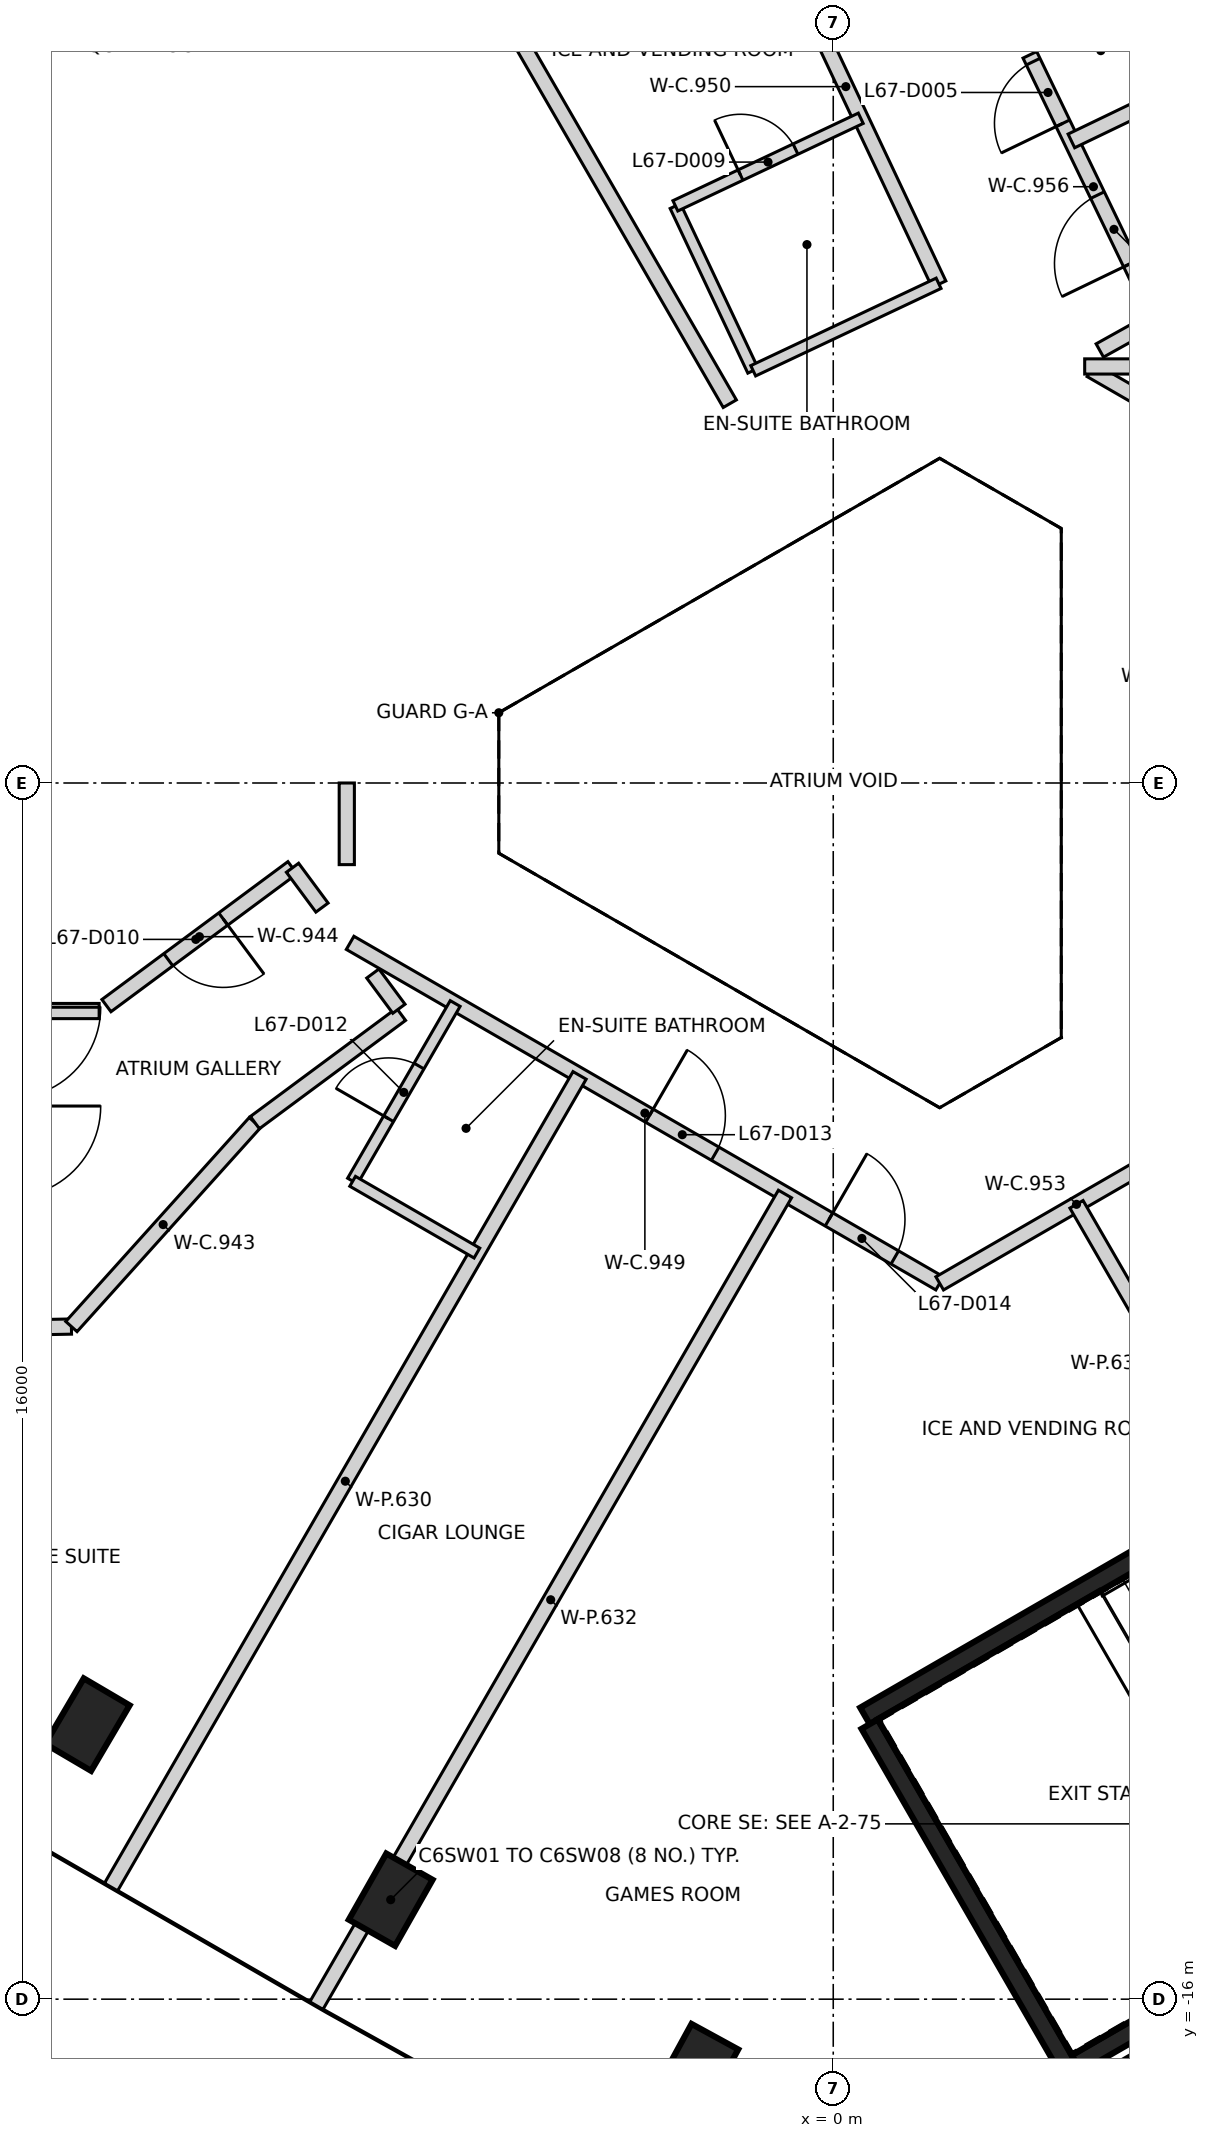
"""IFC4 building model, lengths in metres.
Left out: names, types, materials, properties, quantities, classifications, styles, units other than length and angle.
Written with IfcOpenShell. Run it as: python <this file> out.ifc"""

import sys

from ifc_helpers import new_model, si_unit, direction, frame, frame_2d, origin, origin_2d, place, context, subcontext, project, spatial, rectangle, extrude, element, fill, save


model = new_model("IFC4")
c1 = context("Model", 3, precision=1e-05, world=origin(), true_north=direction((0.0, 1.0)))
c2 = subcontext(c1, "Body", "Model", "MODEL_VIEW")
j1 = project(units=[si_unit("LENGTHUNIT", "METRE"), si_unit("PLANEANGLEUNIT", "RADIAN")], contexts=[c1])
p1 = place(None, origin())
s1 = spatial("IfcSite", under=j1, at=p1, CompositionType="ELEMENT")
p2 = place(p1, origin())
s2 = spatial("IfcBuilding", under=s1, at=p2, CompositionType="ELEMENT")
p3 = place(p2, frame((0.0, 0.0, 265.8)))
s3 = spatial("IfcBuildingStorey", under=s2, at=p3, CompositionType="ELEMENT", Elevation=265.8)
for number, where, z_axis, x_axis in (
    (1, (-9.812, -12.388, -0.35), (0.0, 0.0, 1.0), (0.507, 0.862, 0.0)),
    (2, (-5.822, -14.691, -0.35), (0.0, 0.0, 1.0), (0.493, 0.87, 0.0)),
    (3, (-1.797, -16.932, -0.35), (0.0, 0.0, 1.0), (0.479, 0.878, 0.0)),
):
    element("IfcColumn", number, at=place(p3, frame(where, z_axis=z_axis, x_axis=x_axis)), inside=s3, PredefinedType="COLUMN", context=c2, shape_type="SweptSolid", body=[
        extrude(rectangle(XDim=1.0, YDim=0.7, at=origin_2d()), origin(), (0.0, 0.0, 1.0), 3.6),
    ])
p4 = place(p3, frame((10.42, 6.498, 0.0), z_axis=(0.0, 0.0, 1.0), x_axis=(-0.866021906294, 0.500006057782, 0.0)))
e4 = element("IfcWall", 4, at=p4, inside=s3, PredefinedType="SHEAR", context=c2, shape_type="SweptSolid", body=[
    extrude(rectangle(XDim=11.55, YDim=0.25, at=frame_2d((5.775, 0.0))), origin(), (0.0, 0.0, 1.0), 3.25),
])
p5 = place(p4, frame((10.025, 0.0, 0.0)))
e5 = element("IfcOpeningElement", 5, at=p5, cuts=e4, PredefinedType="OPENING", context=c2, shape_type="SweptSolid", body=[
    extrude(rectangle(XDim=1.2, YDim=2.1, at=frame_2d((0.6, 1.05))), frame((0.0, 0.135, 0.0), z_axis=(0.0, -1.0, 0.0), x_axis=(1.0, 0.0, 0.0)), (0.0, 0.0, 1.0), 0.27),
])
p6 = place(p4, frame((8.725, 0.0, 0.0)))
e6 = element("IfcOpeningElement", 6, at=p6, cuts=e4, PredefinedType="OPENING", context=c2, shape_type="SweptSolid", body=[
    extrude(rectangle(XDim=1.2, YDim=2.1, at=frame_2d((0.6, 1.05))), frame((0.0, 0.135, 0.0), z_axis=(0.0, -1.0, 0.0), x_axis=(1.0, 0.0, 0.0)), (0.0, 0.0, 1.0), 0.27),
])
p7 = place(p3, frame((0.417, -12.273, 0.0), z_axis=(0.0, 0.0, 1.0), x_axis=(0.866021906294, 0.500006057782, 0.0)))
e7 = element("IfcWall", 7, at=p7, inside=s3, PredefinedType="SHEAR", context=c2, shape_type="SweptSolid", body=[
    extrude(rectangle(XDim=11.55, YDim=0.25, at=frame_2d((5.775, 0.0))), origin(), (0.0, 0.0, 1.0), 3.25),
])
p8 = place(p7, frame((10.025, 0.0, 0.0)))
e8 = element("IfcOpeningElement", 8, at=p8, cuts=e7, PredefinedType="OPENING", context=c2, shape_type="SweptSolid", body=[
    extrude(rectangle(XDim=1.2, YDim=2.1, at=frame_2d((0.6, 1.05))), frame((0.0, 0.135, 0.0), z_axis=(0.0, -1.0, 0.0), x_axis=(1.0, 0.0, 0.0)), (0.0, 0.0, 1.0), 0.27),
])
p9 = place(p7, frame((8.725, 0.0, 0.0)))
e9 = element("IfcOpeningElement", 9, at=p9, cuts=e7, PredefinedType="OPENING", context=c2, shape_type="SweptSolid", body=[
    extrude(rectangle(XDim=1.2, YDim=2.1, at=frame_2d((0.6, 1.05))), frame((0.0, 0.135, 0.0), z_axis=(0.0, -1.0, 0.0), x_axis=(1.0, 0.0, 0.0)), (0.0, 0.0, 1.0), 0.27),
])
p10 = place(p3, frame((3.235, -17.153, 0.0), z_axis=(0.0, 0.0, 1.0), x_axis=(-0.500008851346, 0.866020293397, 0.0)))
e10 = element("IfcWall", 10, at=p10, inside=s3, PredefinedType="SHEAR", context=c2, shape_type="SweptSolid", body=[
    extrude(rectangle(XDim=5.51, YDim=0.25, at=frame_2d((2.755, 0.0))), origin(), (0.0, 0.0, 1.0), 3.25),
])
p11 = place(p3, frame((1.669, -18.19, 0.0), z_axis=(0.0, 0.0, 1.0), x_axis=(0.866042235819, 0.499970844928, 0.0)))
e11 = element("IfcWall", 11, at=p11, inside=s3, PredefinedType="SHEAR", context=c2, shape_type="SweptSolid", body=[
    extrude(rectangle(XDim=2.865, YDim=0.25, at=frame_2d((1.432, 0.0))), origin(), (0.0, 0.0, 1.0), 3.25),
])
p12 = place(p3, frame((5.431, -15.556, 0.0), z_axis=(0.0, 0.0, 1.0), x_axis=(-0.866022940537, -0.500004266446, 0.0)))
e12 = element("IfcWall", 12, at=p12, inside=s3, PredefinedType="SHEAR", context=c2, shape_type="SweptSolid", body=[
    extrude(rectangle(XDim=2.575, YDim=0.25, at=frame_2d((1.287, 0.0))), origin(), (0.0, 0.0, 1.0), 3.25),
])
p13 = place(p3, frame((-16.732, -7.282, 0.0), z_axis=(0.0, 0.0, 1.0), x_axis=(0.999809119854, 0.019537754635, 0.0)))
e13 = element("IfcWall", 13, at=p13, inside=s3, PredefinedType="PARTITIONING", context=c2, shape_type="SweptSolid", body=[
    extrude(rectangle(XDim=6.71, YDim=0.2, at=frame_2d((3.355, 0.0))), origin(), (0.0, 0.0, 1.0), 3.25),
])
p14 = place(p13, frame((3.619, 0.0, 0.0)))
e14 = element("IfcOpeningElement", 14, at=p14, cuts=e13, PredefinedType="OPENING", context=c2, shape_type="SweptSolid", body=[
    extrude(rectangle(XDim=0.95, YDim=2.1, at=frame_2d((0.475, 1.05))), frame((0.0, 0.11, 0.0), z_axis=(0.0, -1.0, 0.0), x_axis=(1.0, 0.0, 0.0)), (0.0, 0.0, 1.0), 0.22),
])
p15 = place(p3, frame((-10.652, -3.0, 0.0), z_axis=(0.0, 0.0, 1.0), x_axis=(1.0, 0.0, 0.0)))
e15 = element("IfcWall", 15, at=p15, inside=s3, PredefinedType="PARTITIONING", context=c2, shape_type="SweptSolid", body=[
    extrude(rectangle(XDim=0.994, YDim=0.2, at=frame_2d((0.497, 0.0))), origin(), (0.0, 0.0, 1.0), 3.25),
])
p16 = place(p3, frame((-10.023, -7.151, 0.0), z_axis=(0.0, 0.0, 1.0), x_axis=(0.668886243279, 0.743364778256, 0.0)))
e16 = element("IfcWall", 16, at=p16, inside=s3, PredefinedType="PARTITIONING", context=c2, shape_type="SweptSolid", body=[
    extrude(rectangle(XDim=3.609, YDim=0.2, at=frame_2d((1.805, 0.0))), origin(), (0.0, 0.0, 1.0), 3.25),
])
p17 = place(p3, frame((-7.115, -1.115, 0.0), z_axis=(0.0, 0.0, 1.0), x_axis=(-0.803344165632, -0.595515030495, 0.0)))
e17 = element("IfcWall", 17, at=p17, inside=s3, PredefinedType="PARTITIONING", context=c2, shape_type="SweptSolid", body=[
    extrude(rectangle(XDim=3.046, YDim=0.2, at=frame_2d((1.523, 0.0))), origin(), (0.0, 0.0, 1.0), 3.25),
])
p18 = place(p17, frame((1.133, 0.0, 0.0)))
e18 = element("IfcOpeningElement", 18, at=p18, cuts=e17, PredefinedType="OPENING", context=c2, shape_type="SweptSolid", body=[
    extrude(rectangle(XDim=0.9, YDim=2.1, at=frame_2d((0.45, 1.05))), frame((0.0, 0.11, 0.0), z_axis=(0.0, -1.0, 0.0), x_axis=(1.0, 0.0, 0.0)), (0.0, 0.0, 1.0), 0.22),
])
p19 = place(p3, frame((-7.609, -4.468, 0.0), z_axis=(0.0, 0.0, 1.0), x_axis=(0.803414413351, 0.595420255298, 0.0)))
e19 = element("IfcWall", 19, at=p19, inside=s3, PredefinedType="PARTITIONING", context=c2, shape_type="SweptSolid", body=[
    extrude(rectangle(XDim=2.393, YDim=0.2, at=frame_2d((1.197, 0.0))), origin(), (0.0, 0.0, 1.0), 3.25),
])
p20 = place(p3, frame((-7.114, -1.115, 0.0), z_axis=(0.0, 0.0, 1.0), x_axis=(0.595075286625, -0.803669959155, 0.0)))
e20 = element("IfcWall", 20, at=p20, inside=s3, PredefinedType="PARTITIONING", context=c2, shape_type="SweptSolid", body=[
    extrude(rectangle(XDim=0.652, YDim=0.2, at=frame_2d((0.326, 0.0))), origin(), (0.0, 0.0, 1.0), 3.25),
])
p21 = place(p3, frame((-6.4, -1.074, 0.0), z_axis=(0.0, 0.0, 1.0), x_axis=(0.0, 1.0, 0.0)))
e21 = element("IfcWall", 21, at=p21, inside=s3, PredefinedType="PARTITIONING", context=c2, shape_type="SweptSolid", body=[
    extrude(rectangle(XDim=1.074, YDim=0.2, at=frame_2d((0.537, 0.0))), origin(), (0.0, 0.0, 1.0), 3.25),
])
p22 = place(p3, frame((-6.057, -2.507, 0.0), z_axis=(0.0, 0.0, 1.0), x_axis=(0.594974339713, -0.803744695213, 0.0)))
e22 = element("IfcWall", 22, at=p22, inside=s3, PredefinedType="PARTITIONING", context=c2, shape_type="SweptSolid", body=[
    extrude(rectangle(XDim=0.576, YDim=0.2, at=frame_2d((0.288, 0.0))), origin(), (0.0, 0.0, 1.0), 3.25),
])
p23 = place(p3, frame((-6.356, -2.103, 0.0), z_axis=(0.0, 0.0, 1.0), x_axis=(0.865939059902, -0.50014952218, 0.0)))
e23 = element("IfcWall", 23, at=p23, inside=s3, PredefinedType="PARTITIONING", context=c2, shape_type="SweptSolid", body=[
    extrude(rectangle(XDim=8.956, YDim=0.2, at=frame_2d((4.478, 0.0))), origin(), (0.0, 0.0, 1.0), 3.25),
])
p24 = place(p23, frame((4.546, 0.0, 0.0)))
e24 = element("IfcOpeningElement", 24, at=p24, cuts=e23, PredefinedType="OPENING", context=c2, shape_type="SweptSolid", body=[
    extrude(rectangle(XDim=1.0, YDim=2.1, at=frame_2d((0.5, 1.05))), frame((0.0, 0.11, 0.0), z_axis=(0.0, -1.0, 0.0), x_axis=(1.0, 0.0, 0.0)), (0.0, 0.0, 1.0), 0.22),
])
p25 = place(p23, frame((7.275, 0.0, 0.0)))
e25 = element("IfcOpeningElement", 25, at=p25, cuts=e23, PredefinedType="OPENING", context=c2, shape_type="SweptSolid", body=[
    extrude(rectangle(XDim=1.0, YDim=2.1, at=frame_2d((0.5, 1.05))), frame((0.0, 0.11, 0.0), z_axis=(0.0, -1.0, 0.0), x_axis=(1.0, 0.0, 0.0)), (0.0, 0.0, 1.0), 0.22),
])
p26 = place(p3, frame((-1.06, 11.76, 0.0), z_axis=(0.0, 0.0, 1.0), x_axis=(0.426549824954, -0.904464066081, 0.0)))
e26 = element("IfcWall", 26, at=p26, inside=s3, PredefinedType="PARTITIONING", context=c2, shape_type="SweptSolid", body=[
    extrude(rectangle(XDim=5.747, YDim=0.2, at=frame_2d((2.873, 0.0))), origin(), (0.0, 0.0, 1.0), 3.25),
])
p27 = place(p3, frame((1.401, -6.583, 0.0), z_axis=(0.0, 0.0, 1.0), x_axis=(0.865818713766, 0.500357826853, 0.0)))
e27 = element("IfcWall", 27, at=p27, inside=s3, PredefinedType="PARTITIONING", context=c2, shape_type="SweptSolid", body=[
    extrude(rectangle(XDim=4.157, YDim=0.2, at=frame_2d((2.079, 0.0))), origin(), (0.0, 0.0, 1.0), 3.25),
])
p28 = place(p3, frame((4.26, 6.109, 0.0), z_axis=(0.0, 0.0, 1.0), x_axis=(-0.434189007872, 0.900821794498, 0.0)))
e28 = element("IfcWall", 28, at=p28, inside=s3, PredefinedType="PARTITIONING", context=c2, shape_type="SweptSolid", body=[
    extrude(rectangle(XDim=3.853, YDim=0.2, at=frame_2d((1.926, 0.0))), origin(), (0.0, 0.0, 1.0), 3.25),
])
p29 = place(p28, frame((2.853, 0.0, 0.0)))
e29 = element("IfcOpeningElement", 29, at=p29, cuts=e28, PredefinedType="OPENING", context=c2, shape_type="SweptSolid", body=[
    extrude(rectangle(XDim=0.9, YDim=2.1, at=frame_2d((0.45, 1.05))), frame((0.0, 0.11, 0.0), z_axis=(0.0, -1.0, 0.0), x_axis=(1.0, 0.0, 0.0)), (0.0, 0.0, 1.0), 0.22),
])
p30 = place(p28, frame((0.804, 0.0, 0.0)))
e30 = element("IfcOpeningElement", 30, at=p30, cuts=e28, PredefinedType="OPENING", context=c2, shape_type="SweptSolid", body=[
    extrude(rectangle(XDim=1.0, YDim=2.1, at=frame_2d((0.5, 1.05))), frame((0.0, 0.11, 0.0), z_axis=(0.0, -1.0, 0.0), x_axis=(1.0, 0.0, 0.0)), (0.0, 0.0, 1.0), 0.22),
])
p31 = place(p3, frame((3.39, 5.433, 0.0), z_axis=(0.0, 0.0, 1.0), x_axis=(0.866117799835, -0.499839931186, 0.0)))
e31 = element("IfcWall", 31, at=p31, inside=s3, PredefinedType="PARTITIONING", context=c2, shape_type="SweptSolid", body=[
    extrude(rectangle(XDim=1.859, YDim=0.2, at=frame_2d((0.929, 0.0))), origin(), (0.0, 0.0, 1.0), 3.25),
])
p32 = place(p3, frame((3.507, 5.69, 0.0), z_axis=(0.0, 0.0, 1.0), x_axis=(0.873567976284, 0.486702158215, 0.0)))
e32 = element("IfcWall", 32, at=p32, inside=s3, PredefinedType="PARTITIONING", context=c2, shape_type="SweptSolid", body=[
    extrude(rectangle(XDim=0.861, YDim=0.2, at=frame_2d((0.43, 0.0))), origin(), (0.0, 0.0, 1.0), 3.25),
])
p33 = place(p3, frame((-9.501, -14.524, 0.0), z_axis=(0.0, 0.0, 1.0), x_axis=(0.499964147476, 0.86604610226, 0.0)))
e33 = element("IfcWall", 33, at=p33, inside=s3, PredefinedType="PARTITIONING", context=c2, shape_type="SweptSolid", body=[
    extrude(rectangle(XDim=12.329, YDim=0.2, at=frame_2d((6.165, 0.0))), origin(), (0.0, 0.0, 1.0), 2.35),
])
p34 = place(p3, frame((-7.524, 15.666, 0.0), z_axis=(0.0, 0.0, 1.0), x_axis=(0.499979611936, -0.866037174519, 0.0)))
e34 = element("IfcWall", 34, at=p34, inside=s3, PredefinedType="PARTITIONING", context=c2, shape_type="SweptSolid", body=[
    extrude(rectangle(XDim=12.327, YDim=0.2, at=frame_2d((6.164, 0.0))), origin(), (0.0, 0.0, 1.0), 2.35),
])
p35 = place(p3, frame((-6.8, -16.084, 0.0), z_axis=(0.0, 0.0, 1.0), x_axis=(0.500002425662, 0.866024003323, 0.0)))
e35 = element("IfcWall", 35, at=p35, inside=s3, PredefinedType="PARTITIONING", context=c2, shape_type="SweptSolid", body=[
    extrude(rectangle(XDim=12.329, YDim=0.2, at=frame_2d((6.165, 0.0))), origin(), (0.0, 0.0, 1.0), 3.25),
])
p36 = place(p3, frame((3.133, 8.447, 0.0), z_axis=(0.0, 0.0, 1.0), x_axis=(0.900981876458, 0.433856725538, 0.0)))
e36 = element("IfcWall", 36, at=p36, inside=s3, PredefinedType="PARTITIONING", context=c2, shape_type="SweptSolid", body=[
    extrude(rectangle(XDim=2.143, YDim=0.2, at=frame_2d((1.071, 0.0))), origin(), (0.0, 0.0, 1.0), 3.25),
])
p37 = place(p3, frame((3.2, -5.543, 0.0), z_axis=(0.0, 0.0, 1.0), x_axis=(0.500060428066, -0.865990512813, 0.0)))
e37 = element("IfcWall", 37, at=p37, inside=s3, PredefinedType="PARTITIONING", context=c2, shape_type="SweptSolid", body=[
    extrude(rectangle(XDim=4.252, YDim=0.2, at=frame_2d((2.126, 0.0))), origin(), (0.0, 0.0, 1.0), 3.25),
])
p38 = place(p3, frame((3.308, 5.48, 0.0), z_axis=(0.0, 0.0, 1.0), x_axis=(1.0, 0.0, 0.0)))
e38 = element("IfcWall", 38, at=p38, inside=s3, PredefinedType="PARTITIONING", context=c2, shape_type="SweptSolid", body=[
    extrude(rectangle(XDim=13.971, YDim=0.2, at=frame_2d((6.986, 0.0))), origin(), (0.0, 0.0, 1.0), 2.35),
])
p39 = place(p3, frame((-6.324, -5.237, 0.0), z_axis=(0.0, 0.0, 1.0), x_axis=(0.500294180644, 0.865855491877, 0.0)))
e39 = element("IfcWall", 39, at=p39, inside=s3, PredefinedType="PARTITIONING", context=c2, shape_type="SweptSolid", body=[
    extrude(rectangle(XDim=2.698, YDim=0.15, at=frame_2d((1.349, 0.0))), origin(), (0.0, 0.0, 1.0), 3.25),
])
p40 = place(p39, frame((0.948, 0.0, 0.0)))
e40 = element("IfcOpeningElement", 40, at=p40, cuts=e39, PredefinedType="OPENING", context=c2, shape_type="SweptSolid", body=[
    extrude(rectangle(XDim=0.8, YDim=2.1, at=frame_2d((0.4, 1.05))), frame((0.0, 0.085, 0.0), z_axis=(0.0, -1.0, 0.0), x_axis=(1.0, 0.0, 0.0)), (0.0, 0.0, 1.0), 0.17),
])
p41 = place(p3, frame((-6.323, -5.24, 0.0), z_axis=(0.0, 0.0, 1.0), x_axis=(0.865998231832, -0.50004706025, 0.0)))
e41 = element("IfcWall", 41, at=p41, inside=s3, PredefinedType="PARTITIONING", context=c2, shape_type="SweptSolid", body=[
    extrude(rectangle(XDim=1.888, YDim=0.15, at=frame_2d((0.944, 0.0))), origin(), (0.0, 0.0, 1.0), 3.25),
])
p42 = place(p3, frame((-2.078, 7.59, 0.0), z_axis=(0.0, 0.0, 1.0), x_axis=(0.426709924428, -0.904388545037, 0.0)))
e42 = element("IfcWall", 42, at=p42, inside=s3, PredefinedType="PARTITIONING", context=c2, shape_type="SweptSolid", body=[
    extrude(rectangle(XDim=2.395, YDim=0.15, at=frame_2d((1.198, 0.0))), origin(), (0.0, 0.0, 1.0), 3.25),
])
p43 = place(p3, frame((-2.077, 7.593, 0.0), z_axis=(0.0, 0.0, 1.0), x_axis=(0.904196218291, 0.427117312724, 0.0)))
e43 = element("IfcWall", 43, at=p43, inside=s3, PredefinedType="PARTITIONING", context=c2, shape_type="SweptSolid", body=[
    extrude(rectangle(XDim=2.697, YDim=0.15, at=frame_2d((1.349, 0.0))), origin(), (0.0, 0.0, 1.0), 3.25),
])
p44 = place(p43, frame((0.948, 0.0, 0.0)))
e44 = element("IfcOpeningElement", 44, at=p44, cuts=e43, PredefinedType="OPENING", context=c2, shape_type="SweptSolid", body=[
    extrude(rectangle(XDim=0.8, YDim=2.1, at=frame_2d((0.4, 1.05))), frame((0.0, 0.085, 0.0), z_axis=(0.0, -1.0, 0.0), x_axis=(1.0, 0.0, 0.0)), (0.0, 0.0, 1.0), 0.17),
])
p45 = place(p3, frame((-1.053, 5.423, 0.0), z_axis=(0.0, 0.0, 1.0), x_axis=(0.904370950432, 0.426747213247, 0.0)))
e45 = element("IfcWall", 45, at=p45, inside=s3, PredefinedType="PARTITIONING", context=c2, shape_type="SweptSolid", body=[
    extrude(rectangle(XDim=2.697, YDim=0.15, at=frame_2d((1.348, 0.0))), origin(), (0.0, 0.0, 1.0), 3.25),
])
p46 = place(p29, origin())
e46 = element("IfcDoor", 46, at=p46, inside=s3, OperationType="SINGLE_SWING_LEFT", PredefinedType="DOOR", context=c2, shape_type="SweptSolid", body=[
    extrude(rectangle(XDim=0.9, YDim=2.1, at=frame_2d((0.45, 1.05))), frame((0.0, 0.025, 0.0), z_axis=(0.0, -1.0, 0.0), x_axis=(1.0, 0.0, 0.0)), (0.0, 0.0, 1.0), 0.05),
])
fill(e29, e46)
p47 = place(p30, origin())
e47 = element("IfcDoor", 47, at=p47, inside=s3, OperationType="SINGLE_SWING_LEFT", PredefinedType="DOOR", context=c2, shape_type="SweptSolid", body=[
    extrude(rectangle(XDim=1.0, YDim=2.1, at=frame_2d((0.5, 1.05))), frame((0.0, 0.025, 0.0), z_axis=(0.0, -1.0, 0.0), x_axis=(1.0, 0.0, 0.0)), (0.0, 0.0, 1.0), 0.05),
])
fill(e30, e47)
p48 = place(p44, origin())
e48 = element("IfcDoor", 48, at=p48, inside=s3, OperationType="SINGLE_SWING_LEFT", PredefinedType="DOOR", context=c2, shape_type="SweptSolid", body=[
    extrude(rectangle(XDim=0.8, YDim=2.1, at=frame_2d((0.4, 1.05))), frame((0.0, 0.025, 0.0), z_axis=(0.0, -1.0, 0.0), x_axis=(1.0, 0.0, 0.0)), (0.0, 0.0, 1.0), 0.05),
])
fill(e44, e48)
p49 = place(p18, origin())
e49 = element("IfcDoor", 49, at=p49, inside=s3, OperationType="SINGLE_SWING_LEFT", PredefinedType="DOOR", context=c2, shape_type="SweptSolid", body=[
    extrude(rectangle(XDim=0.9, YDim=2.1, at=frame_2d((0.45, 1.05))), frame((0.0, 0.025, 0.0), z_axis=(0.0, -1.0, 0.0), x_axis=(1.0, 0.0, 0.0)), (0.0, 0.0, 1.0), 0.05),
])
fill(e18, e49)
p50 = place(p40, origin())
e50 = element("IfcDoor", 50, at=p50, inside=s3, OperationType="SINGLE_SWING_LEFT", PredefinedType="DOOR", context=c2, shape_type="SweptSolid", body=[
    extrude(rectangle(XDim=0.8, YDim=2.1, at=frame_2d((0.4, 1.05))), frame((0.0, 0.025, 0.0), z_axis=(0.0, -1.0, 0.0), x_axis=(1.0, 0.0, 0.0)), (0.0, 0.0, 1.0), 0.05),
])
fill(e40, e50)
p51 = place(p24, frame((1.0, 0.0, 0.0), z_axis=(0.0, 0.0, 1.0), x_axis=(-1.0, 0.0, 0.0)))
e51 = element("IfcDoor", 51, at=p51, inside=s3, OperationType="SINGLE_SWING_LEFT", PredefinedType="DOOR", context=c2, shape_type="SweptSolid", body=[
    extrude(rectangle(XDim=1.0, YDim=2.1, at=frame_2d((0.5, 1.05))), frame((0.0, 0.025, 0.0), z_axis=(0.0, -1.0, 0.0), x_axis=(1.0, 0.0, 0.0)), (0.0, 0.0, 1.0), 0.05),
])
fill(e24, e51)
p52 = place(p25, frame((1.0, 0.0, 0.0), z_axis=(0.0, 0.0, 1.0), x_axis=(-1.0, 0.0, 0.0)))
e52 = element("IfcDoor", 52, at=p52, inside=s3, OperationType="SINGLE_SWING_LEFT", PredefinedType="DOOR", context=c2, shape_type="SweptSolid", body=[
    extrude(rectangle(XDim=1.0, YDim=2.1, at=frame_2d((0.5, 1.05))), frame((0.0, 0.025, 0.0), z_axis=(0.0, -1.0, 0.0), x_axis=(1.0, 0.0, 0.0)), (0.0, 0.0, 1.0), 0.05),
])
fill(e25, e52)
save(model, sys.argv[1])
